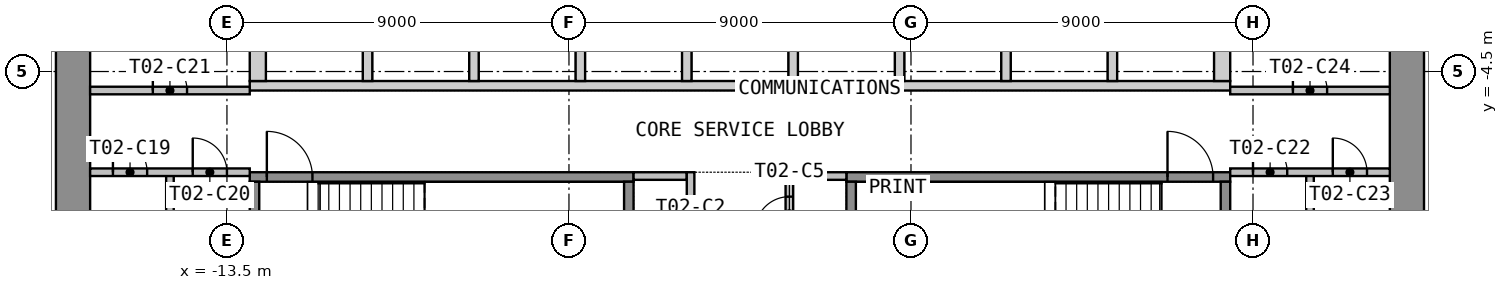
"""IFC4 building model, lengths in metres.
Left out: names, types, materials, properties, quantities, classifications, styles, units other than length and angle.
Written with IfcOpenShell. Run it as: python <this file> out.ifc"""

import sys

from ifc_helpers import new_model, si_unit, direction, frame, frame_2d, origin, place, context, subcontext, project, spatial, polyline, rectangle, outline, extrude, element, fill, save


model = new_model("IFC4")
c1 = context("Model", 3, precision=1e-05, world=origin(), true_north=direction((0.0, 1.0)))
c2 = subcontext(c1, "Body", "Model", "MODEL_VIEW")
j1 = project(units=[si_unit("LENGTHUNIT", "METRE"), si_unit("PLANEANGLEUNIT", "RADIAN")], contexts=[c1])
p1 = place(None, origin())
s1 = spatial("IfcSite", under=j1, at=p1, CompositionType="ELEMENT")
p2 = place(p1, origin())
s2 = spatial("IfcBuilding", under=s1, at=p2, CompositionType="ELEMENT")
p3 = place(p2, frame((0.0, 0.0, 41.7)))
s3 = spatial("IfcBuildingStorey", under=s2, at=p3, CompositionType="ELEMENT", Elevation=41.7)
p4 = place(p3, frame((-17.55, -12.6, 0.0), z_axis=(0.0, 0.0, 1.0), x_axis=(0.0, 1.0, 0.0)))
e1 = element("IfcWall", 1, at=p4, inside=s3, PredefinedType="SHEAR", context=c2, shape_type="SweptSolid", body=[
    extrude(rectangle(XDim=25.2, YDim=0.9, at=frame_2d((12.6, 0.0))), origin(), (0.0, 0.0, 1.0), 3.525),
])
p5 = place(p4, frame((11.4, 0.0, 0.0)))
e2 = element("IfcOpeningElement", 2, at=p5, cuts=e1, PredefinedType="OPENING", context=c2, shape_type="SweptSolid", body=[
    extrude(rectangle(XDim=2.4, YDim=2.1, at=frame_2d((1.2, 1.05))), frame((0.0, 0.46, 0.0), z_axis=(0.0, -1.0, 0.0), x_axis=(1.0, 0.0, 0.0)), (0.0, 0.0, 1.0), 0.92),
])
p6 = place(p3, frame((17.55, -12.6, 0.0), z_axis=(0.0, 0.0, 1.0), x_axis=(0.0, 1.0, 0.0)))
e3 = element("IfcWall", 3, at=p6, inside=s3, PredefinedType="SHEAR", context=c2, shape_type="SweptSolid", body=[
    extrude(rectangle(XDim=25.2, YDim=0.9, at=frame_2d((12.6, 0.0))), origin(), (0.0, 0.0, 1.0), 3.525),
])
p7 = place(p6, frame((11.4, 0.0, 0.0)))
e4 = element("IfcOpeningElement", 4, at=p7, cuts=e3, PredefinedType="OPENING", context=c2, shape_type="SweptSolid", body=[
    extrude(rectangle(XDim=2.4, YDim=2.1, at=frame_2d((1.2, 1.05))), frame((0.0, 0.46, 0.0), z_axis=(0.0, -1.0, 0.0), x_axis=(1.0, 0.0, 0.0)), (0.0, 0.0, 1.0), 0.92),
])
p8 = place(p3, origin())
e5 = element("IfcWall", 5, at=p8, inside=s3, PredefinedType="SHEAR", context=c2, shape_type="SweptSolid", body=[
    extrude(outline(polyline([(-12.9, -5.0), (12.9, -5.0), (12.9, -4.75), (-12.9, -4.75), (-12.9, -5.0)])), origin(), (0.0, 0.0, 1.0), 3.525),
])
p9 = place(p3, origin())
e6 = element("IfcWall", 6, at=p9, inside=s3, PredefinedType="SHEAR", context=c2, shape_type="SweptSolid", body=[
    extrude(outline(polyline([(-12.9, -4.75), (-12.475, -4.75), (-12.475, -2.05), (-12.9, -2.05), (-12.9, -4.75)])), origin(), (0.0, 0.0, 1.0), 3.525),
])
p10 = place(p3, origin())
e7 = element("IfcWall", 7, at=p10, inside=s3, PredefinedType="SHEAR", context=c2, shape_type="SweptSolid", body=[
    extrude(outline(polyline([(-9.925, -4.75), (-9.675, -4.75), (-9.675, -2.05), (-9.925, -2.05), (-9.925, -4.75)])), origin(), (0.0, 0.0, 1.0), 3.525),
])
p11 = place(p3, origin())
e8 = element("IfcWall", 8, at=p11, inside=s3, PredefinedType="SHEAR", context=c2, shape_type="SweptSolid", body=[
    extrude(outline(polyline([(-7.125, -4.75), (-6.875, -4.75), (-6.875, -2.05), (-7.125, -2.05), (-7.125, -4.75)])), origin(), (0.0, 0.0, 1.0), 3.525),
])
p12 = place(p3, origin())
e9 = element("IfcWall", 9, at=p12, inside=s3, PredefinedType="SHEAR", context=c2, shape_type="SweptSolid", body=[
    extrude(outline(polyline([(-4.325, -4.75), (-4.075, -4.75), (-4.075, -2.05), (-4.325, -2.05), (-4.325, -4.75)])), origin(), (0.0, 0.0, 1.0), 3.525),
])
p13 = place(p3, origin())
e10 = element("IfcWall", 10, at=p13, inside=s3, PredefinedType="SHEAR", context=c2, shape_type="SweptSolid", body=[
    extrude(outline(polyline([(-1.525, -4.75), (-1.275, -4.75), (-1.275, -2.05), (-1.525, -2.05), (-1.525, -4.75)])), origin(), (0.0, 0.0, 1.0), 3.525),
])
p14 = place(p3, origin())
e11 = element("IfcWall", 11, at=p14, inside=s3, PredefinedType="SHEAR", context=c2, shape_type="SweptSolid", body=[
    extrude(outline(polyline([(1.275, -4.75), (1.525, -4.75), (1.525, -2.05), (1.275, -2.05), (1.275, -4.75)])), origin(), (0.0, 0.0, 1.0), 3.525),
])
p15 = place(p3, origin())
e12 = element("IfcWall", 12, at=p15, inside=s3, PredefinedType="SHEAR", context=c2, shape_type="SweptSolid", body=[
    extrude(outline(polyline([(4.075, -4.75), (4.325, -4.75), (4.325, -2.05), (4.075, -2.05), (4.075, -4.75)])), origin(), (0.0, 0.0, 1.0), 3.525),
])
p16 = place(p3, origin())
e13 = element("IfcWall", 13, at=p16, inside=s3, PredefinedType="SHEAR", context=c2, shape_type="SweptSolid", body=[
    extrude(outline(polyline([(6.875, -4.75), (7.125, -4.75), (7.125, -2.05), (6.875, -2.05), (6.875, -4.75)])), origin(), (0.0, 0.0, 1.0), 3.525),
])
p17 = place(p3, origin())
e14 = element("IfcWall", 14, at=p17, inside=s3, PredefinedType="SHEAR", context=c2, shape_type="SweptSolid", body=[
    extrude(outline(polyline([(9.675, -4.75), (9.925, -4.75), (9.925, -2.05), (9.675, -2.05), (9.675, -4.75)])), origin(), (0.0, 0.0, 1.0), 3.525),
])
p18 = place(p3, origin())
e15 = element("IfcWall", 15, at=p18, inside=s3, PredefinedType="SHEAR", context=c2, shape_type="SweptSolid", body=[
    extrude(outline(polyline([(12.475, -4.75), (12.9, -4.75), (12.9, -2.05), (12.475, -2.05), (12.475, -4.75)])), origin(), (0.0, 0.0, 1.0), 3.525),
])
p19 = place(p3, frame((-12.9, -7.275, 0.0), z_axis=(0.0, 0.0, 1.0), x_axis=(1.0, 0.0, 0.0)))
e16 = element("IfcWall", 16, at=p19, inside=s3, PredefinedType="SHEAR", context=c2, shape_type="SweptSolid", body=[
    extrude(rectangle(XDim=10.1, YDim=0.25, at=frame_2d((5.05, 0.0))), origin(), (0.0, 0.0, 1.0), 3.525),
])
p20 = place(p19, frame((0.45, 0.0, 0.0)))
e17 = element("IfcOpeningElement", 17, at=p20, cuts=e16, PredefinedType="OPENING", context=c2, shape_type="SweptSolid", body=[
    extrude(rectangle(XDim=1.2, YDim=2.1, at=frame_2d((0.6, 1.05))), frame((0.0, 0.135, 0.0), z_axis=(0.0, -1.0, 0.0), x_axis=(1.0, 0.0, 0.0)), (0.0, 0.0, 1.0), 0.27),
])
for number, where, z_axis, x_axis in (
    (18, (-12.775, -10.65, 0.0), (0.0, 0.0, 1.0), (0.0, 1.0, 0.0)),
    (19, (-2.925, -10.65, 0.0), (0.0, 0.0, 1.0), (0.0, 1.0, 0.0)),
):
    element("IfcWall", number, at=place(p3, frame(where, z_axis=z_axis, x_axis=x_axis)), inside=s3, PredefinedType="SHEAR", context=c2, shape_type="SweptSolid", body=[
        extrude(rectangle(XDim=3.25, YDim=0.25, at=frame_2d((1.625, 0.0))), origin(), (0.0, 0.0, 1.0), 3.525),
    ])
p21 = place(p3, frame((2.8, -7.275, 0.0), z_axis=(0.0, 0.0, 1.0), x_axis=(1.0, 0.0, 0.0)))
e20 = element("IfcWall", 20, at=p21, inside=s3, PredefinedType="SHEAR", context=c2, shape_type="SweptSolid", body=[
    extrude(rectangle(XDim=10.1, YDim=0.25, at=frame_2d((5.05, 0.0))), origin(), (0.0, 0.0, 1.0), 3.525),
])
p22 = place(p21, frame((8.45, 0.0, 0.0)))
e21 = element("IfcOpeningElement", 21, at=p22, cuts=e20, PredefinedType="OPENING", context=c2, shape_type="SweptSolid", body=[
    extrude(rectangle(XDim=1.2, YDim=2.1, at=frame_2d((0.6, 1.05))), frame((0.0, 0.135, 0.0), z_axis=(0.0, -1.0, 0.0), x_axis=(1.0, 0.0, 0.0)), (0.0, 0.0, 1.0), 0.27),
])
for number, where, z_axis, x_axis in (
    (22, (2.925, -10.65, 0.0), (0.0, 0.0, 1.0), (0.0, 1.0, 0.0)),
    (23, (12.775, -10.65, 0.0), (0.0, 0.0, 1.0), (0.0, 1.0, 0.0)),
):
    element("IfcWall", number, at=place(p3, frame(where, z_axis=z_axis, x_axis=x_axis)), inside=s3, PredefinedType="SHEAR", context=c2, shape_type="SweptSolid", body=[
        extrude(rectangle(XDim=3.25, YDim=0.25, at=frame_2d((1.625, 0.0))), origin(), (0.0, 0.0, 1.0), 3.525),
    ])
for number, where, z_axis, x_axis in (
    (24, (-2.8, -7.25, 0.0), (0.0, 0.0, 1.0), (1.0, 0.0, 0.0)),
    (25, (1.4, -7.25, 0.0), (0.0, 0.0, 1.0), (1.0, 0.0, 0.0)),
):
    element("IfcWall", number, at=place(p3, frame(where, z_axis=z_axis, x_axis=x_axis)), inside=s3, PredefinedType="PARTITIONING", context=c2, shape_type="SweptSolid", body=[
        extrude(rectangle(XDim=1.4, YDim=0.2, at=frame_2d((0.7, 0.0))), origin(), (0.0, 0.0, 1.0), 3.525),
    ])
p23 = place(p3, frame((-1.3, -12.6, 0.0), z_axis=(0.0, 0.0, 1.0), x_axis=(0.0, 1.0, 0.0)))
e26 = element("IfcWall", 26, at=p23, inside=s3, PredefinedType="PARTITIONING", context=c2, shape_type="SweptSolid", body=[
    extrude(rectangle(XDim=5.45, YDim=0.2, at=frame_2d((2.725, 0.0))), origin(), (0.0, 0.0, 1.0), 3.525),
])
p24 = place(p23, frame((0.337, 0.0, 0.0)))
e27 = element("IfcOpeningElement", 27, at=p24, cuts=e26, PredefinedType="OPENING", context=c2, shape_type="SweptSolid", body=[
    extrude(rectangle(XDim=0.9, YDim=2.1, at=frame_2d((0.45, 1.05))), frame((0.0, 0.11, 0.0), z_axis=(0.0, -1.0, 0.0), x_axis=(1.0, 0.0, 0.0)), (0.0, 0.0, 1.0), 0.22),
])
p25 = place(p23, frame((2.962, 0.0, 0.0)))
e28 = element("IfcOpeningElement", 28, at=p25, cuts=e26, PredefinedType="OPENING", context=c2, shape_type="SweptSolid", body=[
    extrude(rectangle(XDim=0.9, YDim=2.1, at=frame_2d((0.45, 1.05))), frame((0.0, 0.11, 0.0), z_axis=(0.0, -1.0, 0.0), x_axis=(1.0, 0.0, 0.0)), (0.0, 0.0, 1.0), 0.22),
])
p26 = place(p3, frame((1.3, -12.6, 0.0), z_axis=(0.0, 0.0, 1.0), x_axis=(0.0, 1.0, 0.0)))
e29 = element("IfcWall", 29, at=p26, inside=s3, PredefinedType="PARTITIONING", context=c2, shape_type="SweptSolid", body=[
    extrude(rectangle(XDim=5.45, YDim=0.2, at=frame_2d((2.725, 0.0))), origin(), (0.0, 0.0, 1.0), 3.525),
])
p27 = place(p26, frame((0.416, 0.0, 0.0)))
e30 = element("IfcOpeningElement", 30, at=p27, cuts=e29, PredefinedType="OPENING", context=c2, shape_type="SweptSolid", body=[
    extrude(rectangle(XDim=0.9, YDim=2.1, at=frame_2d((0.45, 1.05))), frame((0.0, 0.11, 0.0), z_axis=(0.0, -1.0, 0.0), x_axis=(1.0, 0.0, 0.0)), (0.0, 0.0, 1.0), 0.22),
])
p28 = place(p26, frame((2.149, 0.0, 0.0)))
e31 = element("IfcOpeningElement", 31, at=p28, cuts=e29, PredefinedType="OPENING", context=c2, shape_type="SweptSolid", body=[
    extrude(rectangle(XDim=0.9, YDim=2.1, at=frame_2d((0.45, 1.05))), frame((0.0, 0.11, 0.0), z_axis=(0.0, -1.0, 0.0), x_axis=(1.0, 0.0, 0.0)), (0.0, 0.0, 1.0), 0.22),
])
p29 = place(p26, frame((3.907, 0.0, 0.0)))
e32 = element("IfcOpeningElement", 32, at=p29, cuts=e29, PredefinedType="OPENING", context=c2, shape_type="SweptSolid", body=[
    extrude(rectangle(XDim=0.9, YDim=2.1, at=frame_2d((0.45, 1.05))), frame((0.0, 0.11, 0.0), z_axis=(0.0, -1.0, 0.0), x_axis=(1.0, 0.0, 0.0)), (0.0, 0.0, 1.0), 0.22),
])
p30 = place(p3, frame((-15.0, -12.6, 0.0), z_axis=(0.0, 0.0, 1.0), x_axis=(0.0, 1.0, 0.0)))
e33 = element("IfcWall", 33, at=p30, inside=s3, PredefinedType="PARTITIONING", context=c2, shape_type="SweptSolid", body=[
    extrude(rectangle(XDim=5.45, YDim=0.2, at=frame_2d((2.725, 0.0))), origin(), (0.0, 0.0, 1.0), 3.525),
])
p31 = place(p3, frame((-17.1, -7.15, 0.0), z_axis=(0.0, 0.0, 1.0), x_axis=(1.0, 0.0, 0.0)))
e34 = element("IfcWall", 34, at=p31, inside=s3, PredefinedType="PARTITIONING", context=c2, shape_type="SweptSolid", body=[
    extrude(rectangle(XDim=4.2, YDim=0.2, at=frame_2d((2.1, 0.0))), origin(), (0.0, 0.0, 1.0), 3.525),
])
p32 = place(p31, frame((0.6, 0.0, 0.0)))
e35 = element("IfcOpeningElement", 35, at=p32, cuts=e34, PredefinedType="OPENING", context=c2, shape_type="SweptSolid", body=[
    extrude(rectangle(XDim=0.9, YDim=2.1, at=frame_2d((0.45, 1.05))), frame((0.0, 0.11, 0.0), z_axis=(0.0, -1.0, 0.0), x_axis=(1.0, 0.0, 0.0)), (0.0, 0.0, 1.0), 0.22),
])
p33 = place(p31, frame((2.7, 0.0, 0.0)))
e36 = element("IfcOpeningElement", 36, at=p33, cuts=e34, PredefinedType="OPENING", context=c2, shape_type="SweptSolid", body=[
    extrude(rectangle(XDim=0.9, YDim=2.1, at=frame_2d((0.45, 1.05))), frame((0.0, 0.11, 0.0), z_axis=(0.0, -1.0, 0.0), x_axis=(1.0, 0.0, 0.0)), (0.0, 0.0, 1.0), 0.22),
])
p34 = place(p3, frame((-17.1, -5.0, 0.0), z_axis=(0.0, 0.0, 1.0), x_axis=(1.0, 0.0, 0.0)))
e37 = element("IfcWall", 37, at=p34, inside=s3, PredefinedType="PARTITIONING", context=c2, shape_type="SweptSolid", body=[
    extrude(rectangle(XDim=4.2, YDim=0.2, at=frame_2d((2.1, 0.0))), origin(), (0.0, 0.0, 1.0), 3.525),
])
p35 = place(p34, frame((1.65, 0.0, 0.0)))
e38 = element("IfcOpeningElement", 38, at=p35, cuts=e37, PredefinedType="OPENING", context=c2, shape_type="SweptSolid", body=[
    extrude(rectangle(XDim=0.9, YDim=2.1, at=frame_2d((0.45, 1.05))), frame((0.0, 0.11, 0.0), z_axis=(0.0, -1.0, 0.0), x_axis=(1.0, 0.0, 0.0)), (0.0, 0.0, 1.0), 0.22),
])
p36 = place(p3, frame((15.0, -12.6, 0.0), z_axis=(0.0, 0.0, 1.0), x_axis=(0.0, 1.0, 0.0)))
e39 = element("IfcWall", 39, at=p36, inside=s3, PredefinedType="PARTITIONING", context=c2, shape_type="SweptSolid", body=[
    extrude(rectangle(XDim=5.45, YDim=0.2, at=frame_2d((2.725, 0.0))), origin(), (0.0, 0.0, 1.0), 3.525),
])
p37 = place(p3, frame((12.9, -7.15, 0.0), z_axis=(0.0, 0.0, 1.0), x_axis=(1.0, 0.0, 0.0)))
e40 = element("IfcWall", 40, at=p37, inside=s3, PredefinedType="PARTITIONING", context=c2, shape_type="SweptSolid", body=[
    extrude(rectangle(XDim=4.2, YDim=0.2, at=frame_2d((2.1, 0.0))), origin(), (0.0, 0.0, 1.0), 3.525),
])
p38 = place(p37, frame((0.6, 0.0, 0.0)))
e41 = element("IfcOpeningElement", 41, at=p38, cuts=e40, PredefinedType="OPENING", context=c2, shape_type="SweptSolid", body=[
    extrude(rectangle(XDim=0.9, YDim=2.1, at=frame_2d((0.45, 1.05))), frame((0.0, 0.11, 0.0), z_axis=(0.0, -1.0, 0.0), x_axis=(1.0, 0.0, 0.0)), (0.0, 0.0, 1.0), 0.22),
])
p39 = place(p37, frame((2.7, 0.0, 0.0)))
e42 = element("IfcOpeningElement", 42, at=p39, cuts=e40, PredefinedType="OPENING", context=c2, shape_type="SweptSolid", body=[
    extrude(rectangle(XDim=0.9, YDim=2.1, at=frame_2d((0.45, 1.05))), frame((0.0, 0.11, 0.0), z_axis=(0.0, -1.0, 0.0), x_axis=(1.0, 0.0, 0.0)), (0.0, 0.0, 1.0), 0.22),
])
p40 = place(p3, frame((12.9, -5.0, 0.0), z_axis=(0.0, 0.0, 1.0), x_axis=(1.0, 0.0, 0.0)))
e43 = element("IfcWall", 43, at=p40, inside=s3, PredefinedType="PARTITIONING", context=c2, shape_type="SweptSolid", body=[
    extrude(rectangle(XDim=4.2, YDim=0.2, at=frame_2d((2.1, 0.0))), origin(), (0.0, 0.0, 1.0), 3.525),
])
p41 = place(p40, frame((1.65, 0.0, 0.0)))
e44 = element("IfcOpeningElement", 44, at=p41, cuts=e43, PredefinedType="OPENING", context=c2, shape_type="SweptSolid", body=[
    extrude(rectangle(XDim=0.9, YDim=2.1, at=frame_2d((0.45, 1.05))), frame((0.0, 0.11, 0.0), z_axis=(0.0, -1.0, 0.0), x_axis=(1.0, 0.0, 0.0)), (0.0, 0.0, 1.0), 0.22),
])
p42 = place(p20, origin())
e45 = element("IfcDoor", 45, at=p42, inside=s3, OperationType="SINGLE_SWING_LEFT", PredefinedType="DOOR", context=c2, shape_type="SweptSolid", body=[
    extrude(rectangle(XDim=1.2, YDim=2.1, at=frame_2d((0.6, 1.05))), frame((0.0, 0.025, 0.0), z_axis=(0.0, -1.0, 0.0), x_axis=(1.0, 0.0, 0.0)), (0.0, 0.0, 1.0), 0.05),
])
fill(e17, e45)
p43 = place(p22, origin())
e46 = element("IfcDoor", 46, at=p43, inside=s3, OperationType="SINGLE_SWING_LEFT", PredefinedType="DOOR", context=c2, shape_type="SweptSolid", body=[
    extrude(rectangle(XDim=1.2, YDim=2.1, at=frame_2d((0.6, 1.05))), frame((0.0, 0.025, 0.0), z_axis=(0.0, -1.0, 0.0), x_axis=(1.0, 0.0, 0.0)), (0.0, 0.0, 1.0), 0.05),
])
fill(e21, e46)
p44 = place(p29, origin())
e47 = element("IfcDoor", 47, at=p44, inside=s3, OperationType="SINGLE_SWING_LEFT", PredefinedType="DOOR", context=c2, shape_type="SweptSolid", body=[
    extrude(rectangle(XDim=0.9, YDim=2.1, at=frame_2d((0.45, 1.05))), frame((0.0, 0.025, 0.0), z_axis=(0.0, -1.0, 0.0), x_axis=(1.0, 0.0, 0.0)), (0.0, 0.0, 1.0), 0.05),
])
fill(e32, e47)
p45 = place(p32, origin())
e48 = element("IfcDoor", 48, at=p45, inside=s3, OperationType="SINGLE_SWING_LEFT", PredefinedType="DOOR", context=c2, shape_type="SweptSolid", body=[
    extrude(rectangle(XDim=0.9, YDim=2.1, at=frame_2d((0.45, 1.05))), frame((0.0, 0.025, 0.0), z_axis=(0.0, -1.0, 0.0), x_axis=(1.0, 0.0, 0.0)), (0.0, 0.0, 1.0), 0.05),
])
fill(e35, e48)
p46 = place(p33, origin())
e49 = element("IfcDoor", 49, at=p46, inside=s3, OperationType="SINGLE_SWING_LEFT", PredefinedType="DOOR", context=c2, shape_type="SweptSolid", body=[
    extrude(rectangle(XDim=0.9, YDim=2.1, at=frame_2d((0.45, 1.05))), frame((0.0, 0.025, 0.0), z_axis=(0.0, -1.0, 0.0), x_axis=(1.0, 0.0, 0.0)), (0.0, 0.0, 1.0), 0.05),
])
fill(e36, e49)
p47 = place(p35, origin())
e50 = element("IfcDoor", 50, at=p47, inside=s3, OperationType="SINGLE_SWING_LEFT", PredefinedType="DOOR", context=c2, shape_type="SweptSolid", body=[
    extrude(rectangle(XDim=0.9, YDim=2.1, at=frame_2d((0.45, 1.05))), frame((0.0, 0.025, 0.0), z_axis=(0.0, -1.0, 0.0), x_axis=(1.0, 0.0, 0.0)), (0.0, 0.0, 1.0), 0.05),
])
fill(e38, e50)
p48 = place(p38, origin())
e51 = element("IfcDoor", 51, at=p48, inside=s3, OperationType="SINGLE_SWING_LEFT", PredefinedType="DOOR", context=c2, shape_type="SweptSolid", body=[
    extrude(rectangle(XDim=0.9, YDim=2.1, at=frame_2d((0.45, 1.05))), frame((0.0, 0.025, 0.0), z_axis=(0.0, -1.0, 0.0), x_axis=(1.0, 0.0, 0.0)), (0.0, 0.0, 1.0), 0.05),
])
fill(e41, e51)
p49 = place(p39, origin())
e52 = element("IfcDoor", 52, at=p49, inside=s3, OperationType="SINGLE_SWING_LEFT", PredefinedType="DOOR", context=c2, shape_type="SweptSolid", body=[
    extrude(rectangle(XDim=0.9, YDim=2.1, at=frame_2d((0.45, 1.05))), frame((0.0, 0.025, 0.0), z_axis=(0.0, -1.0, 0.0), x_axis=(1.0, 0.0, 0.0)), (0.0, 0.0, 1.0), 0.05),
])
fill(e42, e52)
p50 = place(p41, origin())
e53 = element("IfcDoor", 53, at=p50, inside=s3, OperationType="SINGLE_SWING_LEFT", PredefinedType="DOOR", context=c2, shape_type="SweptSolid", body=[
    extrude(rectangle(XDim=0.9, YDim=2.1, at=frame_2d((0.45, 1.05))), frame((0.0, 0.025, 0.0), z_axis=(0.0, -1.0, 0.0), x_axis=(1.0, 0.0, 0.0)), (0.0, 0.0, 1.0), 0.05),
])
fill(e44, e53)
save(model, sys.argv[1])
